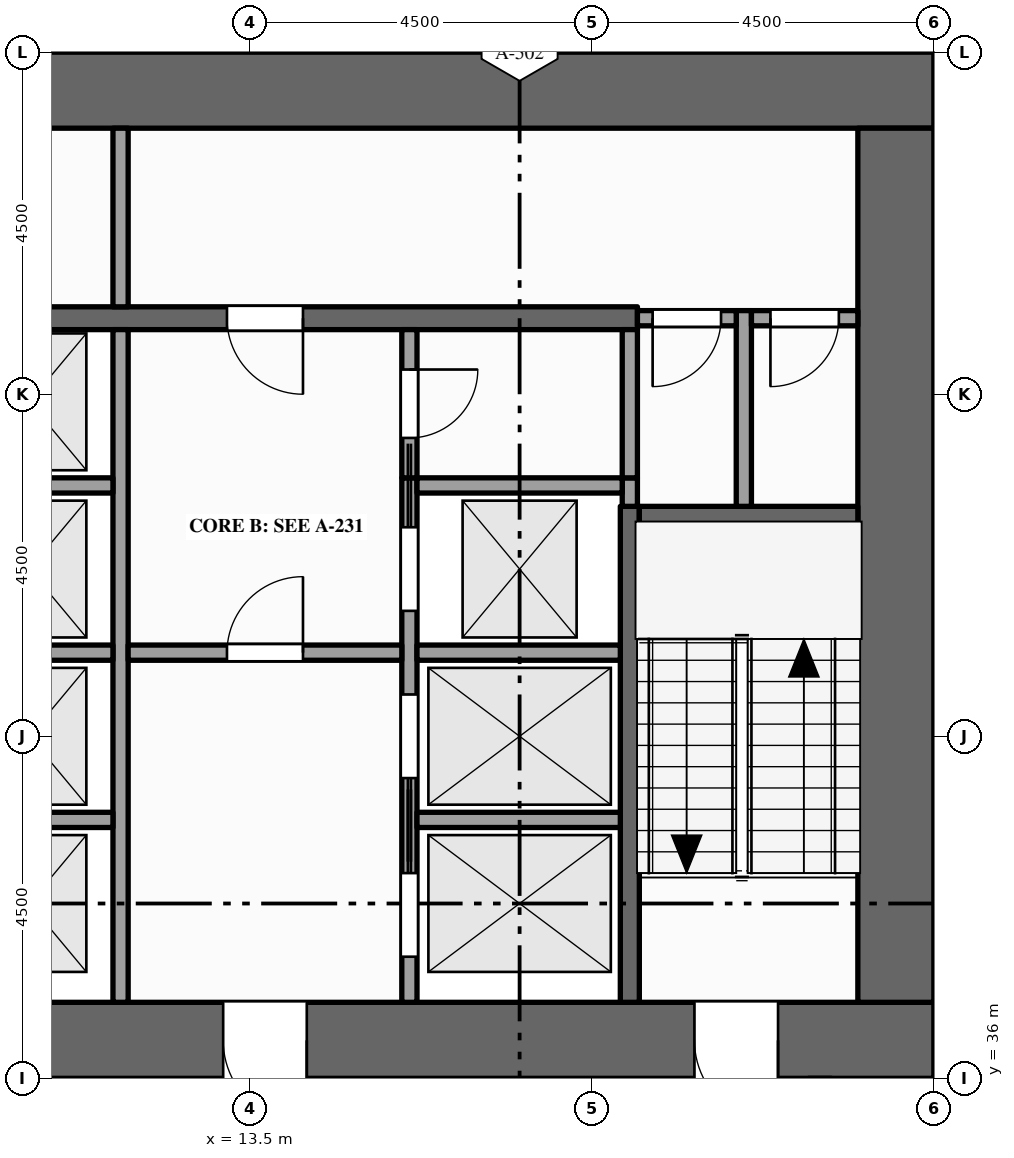
"""IFC4 building model, lengths in metres.
Left out: names, types, materials, properties, quantities, classifications, styles, units other than length and angle.
Written with IfcOpenShell. Run it as: python <this file> out.ifc"""

import sys

from ifc_helpers import new_model, si_unit, direction, frame, frame_2d, origin, place, context, subcontext, project, spatial, rectangle, extrude, element, fill, save


model = new_model("IFC4")
c1 = context("Model", 3, precision=1e-05, world=origin(), true_north=direction((0.0, 1.0)))
c2 = subcontext(c1, "Body", "Model", "MODEL_VIEW")
j1 = project(units=[si_unit("LENGTHUNIT", "METRE"), si_unit("PLANEANGLEUNIT", "RADIAN")], contexts=[c1])
p1 = place(None, origin())
s1 = spatial("IfcSite", under=j1, at=p1, CompositionType="ELEMENT")
p2 = place(p1, origin())
s2 = spatial("IfcBuilding", under=s1, at=p2, CompositionType="ELEMENT")
p3 = place(p2, frame((0.0, 0.0, 171.0)))
s3 = spatial("IfcBuildingStorey", under=s2, at=p3, CompositionType="ELEMENT", Elevation=171.0)
p4 = place(p3, frame((0.0, 36.5, -0.15), z_axis=(0.0, 0.0, 1.0), x_axis=(1.0, 0.0, 0.0)))
e1 = element("IfcWall", 1, at=p4, inside=s3, PredefinedType="SHEAR", context=c2, shape_type="SweptSolid", body=[
    extrude(rectangle(XDim=22.5, YDim=1.0, at=frame_2d((11.25, 0.0))), origin(), (0.0, 0.0, 1.0), 4.0),
])
p5 = place(p4, frame((7.1, 0.0, 0.15)))
e2 = element("IfcOpeningElement", 2, at=p5, cuts=e1, PredefinedType="OPENING", context=c2, shape_type="SweptSolid", body=[
    extrude(rectangle(XDim=1.8, YDim=2.1, at=frame_2d((0.9, 1.05))), frame((0.0, 0.51, 0.0), z_axis=(0.0, -1.0, 0.0), x_axis=(1.0, 0.0, 0.0)), (0.0, 0.0, 1.0), 1.02),
])
p6 = place(p4, frame((13.15, 0.0, 0.15)))
e3 = element("IfcOpeningElement", 3, at=p6, cuts=e1, PredefinedType="OPENING", context=c2, shape_type="SweptSolid", body=[
    extrude(rectangle(XDim=1.1, YDim=2.1, at=frame_2d((0.55, 1.05))), frame((0.0, 0.51, 0.0), z_axis=(0.0, -1.0, 0.0), x_axis=(1.0, 0.0, 0.0)), (0.0, 0.0, 1.0), 1.02),
])
p7 = place(p4, frame((2.15, 0.0, 0.15)))
e4 = element("IfcOpeningElement", 4, at=p7, cuts=e1, PredefinedType="OPENING", context=c2, shape_type="SweptSolid", body=[
    extrude(rectangle(XDim=1.1, YDim=2.1, at=frame_2d((0.55, 1.05))), frame((0.0, 0.51, 0.0), z_axis=(0.0, -1.0, 0.0), x_axis=(1.0, 0.0, 0.0)), (0.0, 0.0, 1.0), 1.02),
])
p8 = place(p4, frame((19.35, 0.0, 0.15)))
e5 = element("IfcOpeningElement", 5, at=p8, cuts=e1, PredefinedType="OPENING", context=c2, shape_type="SweptSolid", body=[
    extrude(rectangle(XDim=1.1, YDim=2.1, at=frame_2d((0.55, 1.05))), frame((0.0, 0.51, 0.0), z_axis=(0.0, -1.0, 0.0), x_axis=(1.0, 0.0, 0.0)), (0.0, 0.0, 1.0), 1.02),
])
p9 = place(p3, frame((0.0, 49.0, -0.15), z_axis=(0.0, 0.0, 1.0), x_axis=(1.0, 0.0, 0.0)))
e6 = element("IfcWall", 6, at=p9, inside=s3, PredefinedType="SHEAR", context=c2, shape_type="SweptSolid", body=[
    extrude(rectangle(XDim=22.5, YDim=1.0, at=frame_2d((11.25, 0.0))), origin(), (0.0, 0.0, 1.0), 4.0),
])
p10 = place(p3, frame((22.0, 37.0, -0.15), z_axis=(0.0, 0.0, 1.0), x_axis=(0.0, 1.0, 0.0)))
e7 = element("IfcWall", 7, at=p10, inside=s3, PredefinedType="SHEAR", context=c2, shape_type="SweptSolid", body=[
    extrude(rectangle(XDim=11.5, YDim=1.0, at=frame_2d((5.75, 0.0))), origin(), (0.0, 0.0, 1.0), 4.0),
])
p11 = place(p3, frame((11.8, 37.0, 0.0), z_axis=(0.0, 0.0, 1.0), x_axis=(0.0, 1.0, 0.0)))
e8 = element("IfcWall", 8, at=p11, inside=s3, PredefinedType="SOLIDWALL", context=c2, shape_type="SweptSolid", body=[
    extrude(rectangle(XDim=8.85, YDim=0.2, at=frame_2d((4.425, 0.0))), origin(), (0.0, 0.0, 1.0), 3.85),
])
p12 = place(p3, frame((11.8, 46.15, 0.0), z_axis=(0.0, 0.0, 1.0), x_axis=(0.0, 1.0, 0.0)))
e9 = element("IfcWall", 9, at=p12, inside=s3, PredefinedType="PARTITIONING", context=c2, shape_type="SweptSolid", body=[
    extrude(rectangle(XDim=2.35, YDim=0.2, at=frame_2d((1.175, 0.0))), origin(), (0.0, 0.0, 1.0), 3.85),
])
p13 = place(p3, frame((15.6, 37.0, 0.0), z_axis=(0.0, 0.0, 1.0), x_axis=(0.0, 1.0, 0.0)))
e10 = element("IfcWall", 10, at=p13, inside=s3, PredefinedType="SOLIDWALL", context=c2, shape_type="SweptSolid", body=[
    extrude(rectangle(XDim=6.9, YDim=0.2, at=frame_2d((3.45, 0.0))), origin(), (0.0, 0.0, 1.0), 3.85),
])
p14 = place(p13, frame((0.6, 0.0, 0.012)))
e11 = element("IfcOpeningElement", 11, at=p14, cuts=e10, PredefinedType="OPENING", context=c2, shape_type="SweptSolid", body=[
    extrude(rectangle(XDim=1.1, YDim=2.1, at=frame_2d((0.55, 1.05))), frame((0.0, 0.11, 0.0), z_axis=(0.0, -1.0, 0.0), x_axis=(1.0, 0.0, 0.0)), (0.0, 0.0, 1.0), 0.22),
])
p15 = place(p13, frame((2.95, 0.0, 0.012)))
e12 = element("IfcOpeningElement", 12, at=p15, cuts=e10, PredefinedType="OPENING", context=c2, shape_type="SweptSolid", body=[
    extrude(rectangle(XDim=1.1, YDim=2.1, at=frame_2d((0.55, 1.05))), frame((0.0, 0.11, 0.0), z_axis=(0.0, -1.0, 0.0), x_axis=(1.0, 0.0, 0.0)), (0.0, 0.0, 1.0), 0.22),
])
p16 = place(p13, frame((5.15, 0.0, 0.012)))
e13 = element("IfcOpeningElement", 13, at=p16, cuts=e10, PredefinedType="OPENING", context=c2, shape_type="SweptSolid", body=[
    extrude(rectangle(XDim=1.1, YDim=2.1, at=frame_2d((0.55, 1.05))), frame((0.0, 0.11, 0.0), z_axis=(0.0, -1.0, 0.0), x_axis=(1.0, 0.0, 0.0)), (0.0, 0.0, 1.0), 0.22),
])
p17 = place(p3, frame((15.6, 43.9, 0.0), z_axis=(0.0, 0.0, 1.0), x_axis=(0.0, 1.0, 0.0)))
e14 = element("IfcWall", 14, at=p17, inside=s3, PredefinedType="PARTITIONING", context=c2, shape_type="SweptSolid", body=[
    extrude(rectangle(XDim=1.95, YDim=0.2, at=frame_2d((0.975, 0.0))), origin(), (0.0, 0.0, 1.0), 3.85),
])
p18 = place(p17, frame((0.525, 0.0, 0.0)))
e15 = element("IfcOpeningElement", 15, at=p18, cuts=e14, PredefinedType="OPENING", context=c2, shape_type="SweptSolid", body=[
    extrude(rectangle(XDim=0.9, YDim=2.1, at=frame_2d((0.45, 1.05))), frame((0.0, 0.11, 0.0), z_axis=(0.0, -1.0, 0.0), x_axis=(1.0, 0.0, 0.0)), (0.0, 0.0, 1.0), 0.22),
])
p19 = place(p3, frame((18.5, 37.0, 0.0), z_axis=(0.0, 0.0, 1.0), x_axis=(0.0, 1.0, 0.0)))
e16 = element("IfcWall", 16, at=p19, inside=s3, PredefinedType="SHEAR", context=c2, shape_type="SweptSolid", body=[
    extrude(rectangle(XDim=6.525, YDim=0.25, at=frame_2d((3.262, 0.0))), origin(), (0.0, 0.0, 1.0), 3.85),
])
p20 = place(p3, frame((18.5, 43.525, 0.0), z_axis=(0.0, 0.0, 1.0), x_axis=(0.0, 1.0, 0.0)))
e17 = element("IfcWall", 17, at=p20, inside=s3, PredefinedType="SOLIDWALL", context=c2, shape_type="SweptSolid", body=[
    extrude(rectangle(XDim=0.375, YDim=0.2, at=frame_2d((0.188, 0.0))), origin(), (0.0, 0.0, 1.0), 3.85),
])
p21 = place(p3, frame((18.5, 43.9, 0.0), z_axis=(0.0, 0.0, 1.0), x_axis=(0.0, 1.0, 0.0)))
e18 = element("IfcWall", 18, at=p21, inside=s3, PredefinedType="PARTITIONING", context=c2, shape_type="SweptSolid", body=[
    extrude(rectangle(XDim=1.95, YDim=0.2, at=frame_2d((0.975, 0.0))), origin(), (0.0, 0.0, 1.0), 3.85),
])
p22 = place(p3, frame((20.0, 43.525, 0.0), z_axis=(0.0, 0.0, 1.0), x_axis=(0.0, 1.0, 0.0)))
e19 = element("IfcWall", 19, at=p22, inside=s3, PredefinedType="PARTITIONING", context=c2, shape_type="SweptSolid", body=[
    extrude(rectangle(XDim=2.575, YDim=0.2, at=frame_2d((1.288, 0.0))), origin(), (0.0, 0.0, 1.0), 3.85),
])
p23 = place(p3, frame((9.5, 39.4, 0.0), z_axis=(0.0, 0.0, 1.0), x_axis=(1.0, 0.0, 0.0)))
e20 = element("IfcWall", 20, at=p23, inside=s3, PredefinedType="SOLIDWALL", context=c2, shape_type="SweptSolid", body=[
    extrude(rectangle(XDim=2.2, YDim=0.2, at=frame_2d((1.1, 0.0))), origin(), (0.0, 0.0, 1.0), 3.85),
])
p24 = place(p3, frame((15.7, 39.4, 0.0), z_axis=(0.0, 0.0, 1.0), x_axis=(1.0, 0.0, 0.0)))
e21 = element("IfcWall", 21, at=p24, inside=s3, PredefinedType="SOLIDWALL", context=c2, shape_type="SweptSolid", body=[
    extrude(rectangle(XDim=2.675, YDim=0.2, at=frame_2d((1.337, 0.0))), origin(), (0.0, 0.0, 1.0), 3.85),
])
p25 = place(p3, frame((9.5, 41.6, 0.0), z_axis=(0.0, 0.0, 1.0), x_axis=(1.0, 0.0, 0.0)))
e22 = element("IfcWall", 22, at=p25, inside=s3, PredefinedType="SOLIDWALL", context=c2, shape_type="SweptSolid", body=[
    extrude(rectangle(XDim=2.2, YDim=0.2, at=frame_2d((1.1, 0.0))), origin(), (0.0, 0.0, 1.0), 3.85),
])
p26 = place(p3, frame((11.9, 41.6, 0.0), z_axis=(0.0, 0.0, 1.0), x_axis=(1.0, 0.0, 0.0)))
e23 = element("IfcWall", 23, at=p26, inside=s3, PredefinedType="PARTITIONING", context=c2, shape_type="SweptSolid", body=[
    extrude(rectangle(XDim=3.6, YDim=0.2, at=frame_2d((1.8, 0.0))), origin(), (0.0, 0.0, 1.0), 3.85),
])
p27 = place(p26, frame((1.3, 0.0, 0.0)))
e24 = element("IfcOpeningElement", 24, at=p27, cuts=e23, PredefinedType="OPENING", context=c2, shape_type="SweptSolid", body=[
    extrude(rectangle(XDim=1.0, YDim=2.1, at=frame_2d((0.5, 1.05))), frame((0.0, 0.11, 0.0), z_axis=(0.0, -1.0, 0.0), x_axis=(1.0, 0.0, 0.0)), (0.0, 0.0, 1.0), 0.22),
])
p28 = place(p3, frame((15.7, 41.6, 0.0), z_axis=(0.0, 0.0, 1.0), x_axis=(1.0, 0.0, 0.0)))
e25 = element("IfcWall", 25, at=p28, inside=s3, PredefinedType="SOLIDWALL", context=c2, shape_type="SweptSolid", body=[
    extrude(rectangle(XDim=2.675, YDim=0.2, at=frame_2d((1.337, 0.0))), origin(), (0.0, 0.0, 1.0), 3.85),
])
p29 = place(p3, frame((18.625, 43.4, 0.0), z_axis=(0.0, 0.0, 1.0), x_axis=(1.0, 0.0, 0.0)))
e26 = element("IfcWall", 26, at=p29, inside=s3, PredefinedType="SHEAR", context=c2, shape_type="SweptSolid", body=[
    extrude(rectangle(XDim=2.875, YDim=0.25, at=frame_2d((1.438, 0.0))), origin(), (0.0, 0.0, 1.0), 3.85),
])
p30 = place(p3, frame((9.5, 43.8, 0.0), z_axis=(0.0, 0.0, 1.0), x_axis=(1.0, 0.0, 0.0)))
e27 = element("IfcWall", 27, at=p30, inside=s3, PredefinedType="SOLIDWALL", context=c2, shape_type="SweptSolid", body=[
    extrude(rectangle(XDim=2.2, YDim=0.2, at=frame_2d((1.1, 0.0))), origin(), (0.0, 0.0, 1.0), 3.85),
])
p31 = place(p3, frame((15.7, 43.8, 0.0), z_axis=(0.0, 0.0, 1.0), x_axis=(1.0, 0.0, 0.0)))
e28 = element("IfcWall", 28, at=p31, inside=s3, PredefinedType="SOLIDWALL", context=c2, shape_type="SweptSolid", body=[
    extrude(rectangle(XDim=2.7, YDim=0.2, at=frame_2d((1.35, 0.0))), origin(), (0.0, 0.0, 1.0), 3.85),
])
p32 = place(p3, frame((4.1, 46.0, 0.0), z_axis=(0.0, 0.0, 1.0), x_axis=(1.0, 0.0, 0.0)))
e29 = element("IfcWall", 29, at=p32, inside=s3, PredefinedType="SHEAR", context=c2, shape_type="SweptSolid", body=[
    extrude(rectangle(XDim=14.5, YDim=0.3, at=frame_2d((7.25, 0.0))), origin(), (0.0, 0.0, 1.0), 3.85),
])
p33 = place(p32, frame((3.4, 0.0, 0.0)))
e30 = element("IfcOpeningElement", 30, at=p33, cuts=e29, PredefinedType="OPENING", context=c2, shape_type="SweptSolid", body=[
    extrude(rectangle(XDim=1.0, YDim=2.1, at=frame_2d((0.5, 1.05))), frame((0.0, 0.16, 0.0), z_axis=(0.0, -1.0, 0.0), x_axis=(1.0, 0.0, 0.0)), (0.0, 0.0, 1.0), 0.32),
])
p34 = place(p32, frame((9.1, 0.0, 0.0)))
e31 = element("IfcOpeningElement", 31, at=p34, cuts=e29, PredefinedType="OPENING", context=c2, shape_type="SweptSolid", body=[
    extrude(rectangle(XDim=1.0, YDim=2.1, at=frame_2d((0.5, 1.05))), frame((0.0, 0.16, 0.0), z_axis=(0.0, -1.0, 0.0), x_axis=(1.0, 0.0, 0.0)), (0.0, 0.0, 1.0), 0.32),
])
p35 = place(p3, frame((18.6, 46.0, 0.0), z_axis=(0.0, 0.0, 1.0), x_axis=(1.0, 0.0, 0.0)))
e32 = element("IfcWall", 32, at=p35, inside=s3, PredefinedType="PARTITIONING", context=c2, shape_type="SweptSolid", body=[
    extrude(rectangle(XDim=1.3, YDim=0.2, at=frame_2d((0.65, 0.0))), origin(), (0.0, 0.0, 1.0), 3.85),
])
p36 = place(p35, frame((0.2, 0.0, 0.0)))
e33 = element("IfcOpeningElement", 33, at=p36, cuts=e32, PredefinedType="OPENING", context=c2, shape_type="SweptSolid", body=[
    extrude(rectangle(XDim=0.9, YDim=2.1, at=frame_2d((0.45, 1.05))), frame((0.0, 0.11, 0.0), z_axis=(0.0, -1.0, 0.0), x_axis=(1.0, 0.0, 0.0)), (0.0, 0.0, 1.0), 0.22),
])
p37 = place(p3, frame((20.1, 46.0, 0.0), z_axis=(0.0, 0.0, 1.0), x_axis=(1.0, 0.0, 0.0)))
e34 = element("IfcWall", 34, at=p37, inside=s3, PredefinedType="PARTITIONING", context=c2, shape_type="SweptSolid", body=[
    extrude(rectangle(XDim=1.4, YDim=0.2, at=frame_2d((0.7, 0.0))), origin(), (0.0, 0.0, 1.0), 3.85),
])
p38 = place(p37, frame((0.25, 0.0, 0.0)))
e35 = element("IfcOpeningElement", 35, at=p38, cuts=e34, PredefinedType="OPENING", context=c2, shape_type="SweptSolid", body=[
    extrude(rectangle(XDim=0.9, YDim=2.1, at=frame_2d((0.45, 1.05))), frame((0.0, 0.11, 0.0), z_axis=(0.0, -1.0, 0.0), x_axis=(1.0, 0.0, 0.0)), (0.0, 0.0, 1.0), 0.22),
])
p39 = place(p14, origin())
e36 = element("IfcDoor", 36, at=p39, inside=s3, OperationType="SLIDING_TO_RIGHT", PredefinedType="DOOR", context=c2, shape_type="SweptSolid", body=[
    extrude(rectangle(XDim=1.1, YDim=2.1, at=frame_2d((0.55, 1.05))), frame((0.0, 0.025, 0.0), z_axis=(0.0, -1.0, 0.0), x_axis=(1.0, 0.0, 0.0)), (0.0, 0.0, 1.0), 0.05),
])
fill(e11, e36)
p40 = place(p15, origin())
e37 = element("IfcDoor", 37, at=p40, inside=s3, OperationType="SLIDING_TO_LEFT", PredefinedType="DOOR", context=c2, shape_type="SweptSolid", body=[
    extrude(rectangle(XDim=1.1, YDim=2.1, at=frame_2d((0.55, 1.05))), frame((0.0, 0.025, 0.0), z_axis=(0.0, -1.0, 0.0), x_axis=(1.0, 0.0, 0.0)), (0.0, 0.0, 1.0), 0.05),
])
fill(e12, e37)
p41 = place(p16, origin())
e38 = element("IfcDoor", 38, at=p41, inside=s3, OperationType="SLIDING_TO_RIGHT", PredefinedType="DOOR", context=c2, shape_type="SweptSolid", body=[
    extrude(rectangle(XDim=1.1, YDim=2.1, at=frame_2d((0.55, 1.05))), frame((0.0, 0.025, 0.0), z_axis=(0.0, -1.0, 0.0), x_axis=(1.0, 0.0, 0.0)), (0.0, 0.0, 1.0), 0.05),
])
fill(e13, e38)
p42 = place(p6, origin())
e39 = element("IfcDoor", 39, at=p42, inside=s3, OperationType="SINGLE_SWING_RIGHT", PredefinedType="DOOR", context=c2, shape_type="SweptSolid", body=[
    extrude(rectangle(XDim=1.1, YDim=2.1, at=frame_2d((0.55, 1.05))), frame((0.0, 0.025, 0.0), z_axis=(0.0, -1.0, 0.0), x_axis=(1.0, 0.0, 0.0)), (0.0, 0.0, 1.0), 0.05),
])
fill(e3, e39)
p43 = place(p27, origin())
e40 = element("IfcDoor", 40, at=p43, inside=s3, OperationType="SINGLE_SWING_RIGHT", PredefinedType="DOOR", context=c2, shape_type="SweptSolid", body=[
    extrude(rectangle(XDim=1.0, YDim=2.1, at=frame_2d((0.5, 1.05))), frame((0.0, 0.025, 0.0), z_axis=(0.0, -1.0, 0.0), x_axis=(1.0, 0.0, 0.0)), (0.0, 0.0, 1.0), 0.05),
])
fill(e24, e40)
p44 = place(p34, origin())
e41 = element("IfcDoor", 41, at=p44, inside=s3, OperationType="SINGLE_SWING_RIGHT", PredefinedType="DOOR", context=c2, shape_type="SweptSolid", body=[
    extrude(rectangle(XDim=1.0, YDim=2.1, at=frame_2d((0.5, 1.05))), frame((0.0, 0.025, 0.0), z_axis=(0.0, -1.0, 0.0), x_axis=(1.0, 0.0, 0.0)), (0.0, 0.0, 1.0), 0.05),
])
fill(e31, e41)
p45 = place(p8, origin())
e42 = element("IfcDoor", 42, at=p45, inside=s3, OperationType="SINGLE_SWING_RIGHT", PredefinedType="DOOR", context=c2, shape_type="SweptSolid", body=[
    extrude(rectangle(XDim=1.1, YDim=2.1, at=frame_2d((0.55, 1.05))), frame((0.0, 0.025, 0.0), z_axis=(0.0, -1.0, 0.0), x_axis=(1.0, 0.0, 0.0)), (0.0, 0.0, 1.0), 0.05),
])
fill(e5, e42)
p46 = place(p36, origin())
e43 = element("IfcDoor", 43, at=p46, inside=s3, OperationType="SINGLE_SWING_LEFT", PredefinedType="DOOR", context=c2, shape_type="SweptSolid", body=[
    extrude(rectangle(XDim=0.9, YDim=2.1, at=frame_2d((0.45, 1.05))), frame((0.0, 0.025, 0.0), z_axis=(0.0, -1.0, 0.0), x_axis=(1.0, 0.0, 0.0)), (0.0, 0.0, 1.0), 0.05),
])
fill(e33, e43)
p47 = place(p38, origin())
e44 = element("IfcDoor", 44, at=p47, inside=s3, OperationType="SINGLE_SWING_LEFT", PredefinedType="DOOR", context=c2, shape_type="SweptSolid", body=[
    extrude(rectangle(XDim=0.9, YDim=2.1, at=frame_2d((0.45, 1.05))), frame((0.0, 0.025, 0.0), z_axis=(0.0, -1.0, 0.0), x_axis=(1.0, 0.0, 0.0)), (0.0, 0.0, 1.0), 0.05),
])
fill(e35, e44)
p48 = place(p18, origin())
e45 = element("IfcDoor", 45, at=p48, inside=s3, OperationType="SINGLE_SWING_RIGHT", PredefinedType="DOOR", context=c2, shape_type="SweptSolid", body=[
    extrude(rectangle(XDim=0.9, YDim=2.1, at=frame_2d((0.45, 1.05))), frame((0.0, 0.025, 0.0), z_axis=(0.0, -1.0, 0.0), x_axis=(1.0, 0.0, 0.0)), (0.0, 0.0, 1.0), 0.05),
])
fill(e15, e45)
save(model, sys.argv[1])
